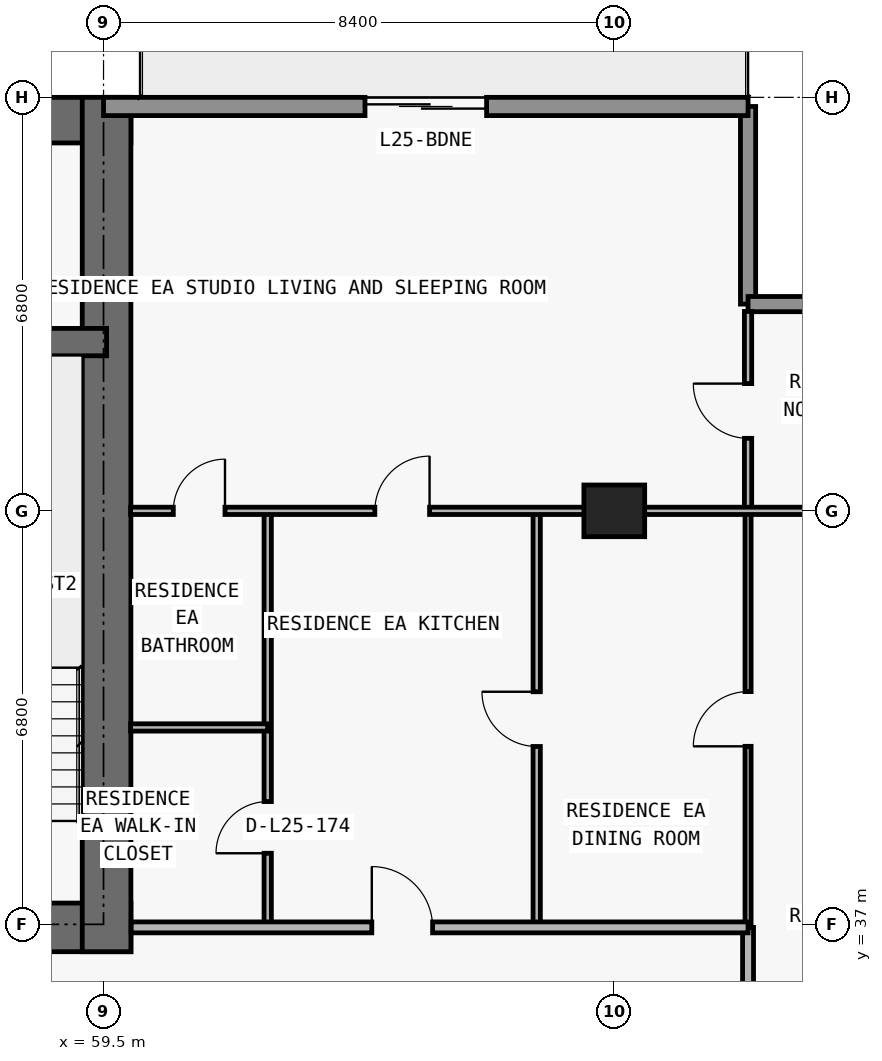
"""IFC4 building model, lengths in metres.
Left out: names, types, materials, properties, quantities, classifications, styles, units other than length and angle.
Written with IfcOpenShell. Run it as: python <this file> out.ifc"""

import sys

from ifc_helpers import new_model, si_unit, direction, frame, frame_2d, origin, origin_2d, place, context, subcontext, project, spatial, rectangle, extrude, element, fill, save


model = new_model("IFC4")
c1 = context("Model", 3, precision=1e-05, world=origin(), true_north=direction((0.0, 1.0)))
c2 = subcontext(c1, "Body", "Model", "MODEL_VIEW")
j1 = project(units=[si_unit("LENGTHUNIT", "METRE"), si_unit("PLANEANGLEUNIT", "RADIAN")], contexts=[c1])
p1 = place(None, origin())
s1 = spatial("IfcSite", under=j1, at=p1, CompositionType="ELEMENT")
p2 = place(p1, origin())
s2 = spatial("IfcBuilding", under=s1, at=p2, CompositionType="ELEMENT")
p3 = place(p2, frame((0.0, 0.0, 94.5)))
s3 = spatial("IfcBuildingStorey", under=s2, at=p3, CompositionType="ELEMENT", Elevation=94.5)
p4 = place(p3, frame((67.9, 43.8, 0.0), z_axis=(0.0, 0.0, 1.0), x_axis=(1.0, 0.0, 0.0)))
e1 = element("IfcColumn", 1, at=p4, inside=s3, PredefinedType="COLUMN", context=c2, shape_type="SweptSolid", body=[
    extrude(rectangle(XDim=1.0, YDim=0.85, at=origin_2d()), origin(), (0.0, 0.0, 1.0), 3.0),
])
p5 = place(p3, frame((17.85, 36.95, 0.0), z_axis=(0.0, 0.0, 1.0), x_axis=(1.0, 0.0, 0.0)))
e2 = element("IfcWall", 2, at=p5, inside=s3, PredefinedType="SHEAR", context=c2, shape_type="SweptSolid", body=[
    extrude(rectangle(XDim=42.1, YDim=0.8, at=frame_2d((21.05, 0.0))), origin(), (0.0, 0.0, 1.0), 3.0),
])
p6 = place(p5, frame((14.45, 0.0, 0.0)))
e3 = element("IfcOpeningElement", 3, at=p6, cuts=e2, PredefinedType="OPENING", context=c2, shape_type="SweptSolid", body=[
    extrude(rectangle(XDim=1.1, YDim=2.15, at=frame_2d((0.55, 1.075))), frame((0.0, 0.41, 0.0), z_axis=(0.0, -1.0, 0.0), x_axis=(1.0, 0.0, 0.0)), (0.0, 0.0, 1.0), 0.82),
])
p7 = place(p5, frame((6.3, 0.0, 0.0)))
e4 = element("IfcOpeningElement", 4, at=p7, cuts=e2, PredefinedType="OPENING", context=c2, shape_type="SweptSolid", body=[
    extrude(rectangle(XDim=1.05, YDim=2.15, at=frame_2d((0.525, 1.075))), frame((0.0, 0.41, 0.0), z_axis=(0.0, -1.0, 0.0), x_axis=(1.0, 0.0, 0.0)), (0.0, 0.0, 1.0), 0.82),
])
p8 = place(p5, frame((34.8, 0.0, 0.0)))
e5 = element("IfcOpeningElement", 5, at=p8, cuts=e2, PredefinedType="OPENING", context=c2, shape_type="SweptSolid", body=[
    extrude(rectangle(XDim=1.05, YDim=2.15, at=frame_2d((0.525, 1.075))), frame((0.0, 0.41, 0.0), z_axis=(0.0, -1.0, 0.0), x_axis=(1.0, 0.0, 0.0)), (0.0, 0.0, 1.0), 0.82),
])
p9 = place(p5, frame((10.913, 0.0, 0.0)))
e6 = element("IfcOpeningElement", 6, at=p9, cuts=e2, PredefinedType="OPENING", context=c2, shape_type="SweptSolid", body=[
    extrude(rectangle(XDim=1.05, YDim=2.15, at=frame_2d((0.525, 1.075))), frame((0.0, 0.41, 0.0), z_axis=(0.0, -1.0, 0.0), x_axis=(1.0, 0.0, 0.0)), (0.0, 0.0, 1.0), 0.82),
])
p10 = place(p5, frame((24.15, 0.0, 0.0)))
e7 = element("IfcOpeningElement", 7, at=p10, cuts=e2, PredefinedType="OPENING", context=c2, shape_type="SweptSolid", body=[
    extrude(rectangle(XDim=1.05, YDim=2.15, at=frame_2d((0.525, 1.075))), frame((0.0, 0.41, 0.0), z_axis=(0.0, -1.0, 0.0), x_axis=(1.0, 0.0, 0.0)), (0.0, 0.0, 1.0), 0.82),
])
p11 = place(p3, frame((17.85, 50.225, 0.0), z_axis=(0.0, 0.0, 1.0), x_axis=(1.0, 0.0, 0.0)))
e8 = element("IfcWall", 8, at=p11, inside=s3, PredefinedType="SHEAR", context=c2, shape_type="SweptSolid", body=[
    extrude(rectangle(XDim=42.1, YDim=0.75, at=frame_2d((21.05, 0.0))), origin(), (0.0, 0.0, 1.0), 3.0),
])
p12 = place(p3, frame((59.55, 36.55, 0.0), z_axis=(0.0, 0.0, 1.0), x_axis=(0.0, 1.0, 0.0)))
e9 = element("IfcWall", 9, at=p12, inside=s3, PredefinedType="SHEAR", context=c2, shape_type="SweptSolid", body=[
    extrude(rectangle(XDim=14.05, YDim=0.8, at=frame_2d((7.025, 0.0))), origin(), (0.0, 0.0, 1.0), 3.0),
])
p13 = place(p3, frame((18.25, 46.575, 0.0), z_axis=(0.0, 0.0, 1.0), x_axis=(1.0, 0.0, 0.0)))
e10 = element("IfcWall", 10, at=p13, inside=s3, PredefinedType="SHEAR", context=c2, shape_type="SweptSolid", body=[
    extrude(rectangle(XDim=41.3, YDim=0.45, at=frame_2d((20.65, 0.0))), origin(), (0.0, 0.0, 1.0), 3.0),
])
p14 = place(p13, frame((7.625, 0.0, 0.0)))
e11 = element("IfcOpeningElement", 11, at=p14, cuts=e10, PredefinedType="OPENING", context=c2, shape_type="SweptSolid", body=[
    extrude(rectangle(XDim=1.05, YDim=2.15, at=frame_2d((0.525, 1.075))), frame((0.0, 0.235, 0.0), z_axis=(0.0, -1.0, 0.0), x_axis=(1.0, 0.0, 0.0)), (0.0, 0.0, 1.0), 0.47),
])
p15 = place(p13, frame((32.675, 0.0, 0.0)))
e12 = element("IfcOpeningElement", 12, at=p15, cuts=e10, PredefinedType="OPENING", context=c2, shape_type="SweptSolid", body=[
    extrude(rectangle(XDim=1.05, YDim=2.15, at=frame_2d((0.525, 1.075))), frame((0.0, 0.235, 0.0), z_axis=(0.0, -1.0, 0.0), x_axis=(1.0, 0.0, 0.0)), (0.0, 0.0, 1.0), 0.47),
])
p16 = place(p3, frame((70.1, 50.45, 0.0), z_axis=(0.0, 0.0, 1.0), x_axis=(0.0, -1.0, 0.0)))
e13 = element("IfcWall", 13, at=p16, inside=s3, PredefinedType="ELEMENTEDWALL", context=c2, shape_type="SweptSolid", body=[
    extrude(rectangle(XDim=3.25, YDim=0.25, at=frame_2d((1.625, 0.0))), origin(), (0.0, 0.0, 1.0), 3.0),
])
p17 = place(p3, frame((70.1, 47.2, 0.0), z_axis=(0.0, 0.0, 1.0), x_axis=(1.0, 0.0, 0.0)))
e14 = element("IfcWall", 14, at=p17, inside=s3, PredefinedType="ELEMENTEDWALL", context=c2, shape_type="SweptSolid", body=[
    extrude(rectangle(XDim=3.65, YDim=0.25, at=frame_2d((1.825, 0.0))), origin(), (0.0, 0.0, 1.0), 3.0),
])
p18 = place(p3, frame((59.5, 50.45, 0.0), z_axis=(0.0, 0.0, 1.0), x_axis=(1.0, 0.0, 0.0)))
e15 = element("IfcWall", 15, at=p18, inside=s3, PredefinedType="STANDARD", context=c2, shape_type="SweptSolid", body=[
    extrude(rectangle(XDim=10.6, YDim=0.3, at=frame_2d((5.3, 0.0))), origin(), (0.0, 0.0, 1.0), 3.0),
])
p19 = place(p18, frame((4.3, 0.0, 0.0)))
e16 = element("IfcOpeningElement", 16, at=p19, cuts=e15, PredefinedType="OPENING", context=c2, shape_type="SweptSolid", body=[
    extrude(rectangle(XDim=2.0, YDim=2.3, at=frame_2d((1.0, 1.15))), frame((0.0, 0.16, 0.0), z_axis=(0.0, -1.0, 0.0), x_axis=(1.0, 0.0, 0.0)), (0.0, 0.0, 1.0), 0.32),
])
p20 = place(p3, frame((62.2, 36.95, 0.0), z_axis=(0.0, 0.0, 1.0), x_axis=(0.0, 1.0, 0.0)))
e17 = element("IfcWall", 17, at=p20, inside=s3, PredefinedType="PARTITIONING", context=c2, shape_type="SweptSolid", body=[
    extrude(rectangle(XDim=6.85, YDim=0.12, at=frame_2d((3.425, 0.0))), origin(), (0.0, 0.0, 1.0), 3.0),
])
p21 = place(p20, frame((1.219, 0.0, 0.0)))
e18 = element("IfcOpeningElement", 18, at=p21, cuts=e17, PredefinedType="OPENING", context=c2, shape_type="SweptSolid", body=[
    extrude(rectangle(XDim=0.85, YDim=2.1, at=frame_2d((0.425, 1.05))), frame((0.0, 0.07, 0.0), z_axis=(0.0, -1.0, 0.0), x_axis=(1.0, 0.0, 0.0)), (0.0, 0.0, 1.0), 0.14),
])
p22 = place(p3, frame((66.624, 36.95, 0.0), z_axis=(0.0, 0.0, 1.0), x_axis=(0.0, 1.0, 0.0)))
e19 = element("IfcWall", 19, at=p22, inside=s3, PredefinedType="PARTITIONING", context=c2, shape_type="SweptSolid", body=[
    extrude(rectangle(XDim=6.85, YDim=0.12, at=frame_2d((3.425, 0.0))), origin(), (0.0, 0.0, 1.0), 3.0),
])
p23 = place(p22, frame((2.975, 0.0, 0.0)))
e20 = element("IfcOpeningElement", 20, at=p23, cuts=e19, PredefinedType="OPENING", context=c2, shape_type="SweptSolid", body=[
    extrude(rectangle(XDim=0.9, YDim=2.15, at=frame_2d((0.45, 1.075))), frame((0.0, 0.07, 0.0), z_axis=(0.0, -1.0, 0.0), x_axis=(1.0, 0.0, 0.0)), (0.0, 0.0, 1.0), 0.14),
])
p24 = place(p3, frame((70.1, 33.805, 0.0), z_axis=(0.0, 0.0, 1.0), x_axis=(0.0, 1.0, 0.0)))
e21 = element("IfcWall", 21, at=p24, inside=s3, PredefinedType="PARTITIONING", context=c2, shape_type="SweptSolid", body=[
    extrude(rectangle(XDim=3.145, YDim=0.18, at=frame_2d((1.573, 0.0))), origin(), (0.0, 0.0, 1.0), 3.0),
])
p25 = place(p3, frame((70.1, 36.955, 0.0), z_axis=(0.0, 0.0, 1.0), x_axis=(0.0, 1.0, 0.0)))
e22 = element("IfcWall", 22, at=p25, inside=s3, PredefinedType="MOVABLE", context=c2, shape_type="SweptSolid", body=[
    extrude(rectangle(XDim=6.845, YDim=0.1, at=frame_2d((3.422, 0.0))), origin(), (0.0, 0.0, 1.0), 3.0),
])
p26 = place(p25, frame((2.972, 0.0, 0.0)))
e23 = element("IfcOpeningElement", 23, at=p26, cuts=e22, PredefinedType="OPENING", context=c2, shape_type="SweptSolid", body=[
    extrude(rectangle(XDim=0.9, YDim=2.15, at=frame_2d((0.45, 1.075))), frame((0.0, 0.06, 0.0), z_axis=(0.0, -1.0, 0.0), x_axis=(1.0, 0.0, 0.0)), (0.0, 0.0, 1.0), 0.12),
])
p27 = place(p3, frame((70.1, 43.805, 0.0), z_axis=(0.0, 0.0, 1.0), x_axis=(0.0, 1.0, 0.0)))
e24 = element("IfcWall", 24, at=p27, inside=s3, PredefinedType="PARTITIONING", context=c2, shape_type="SweptSolid", body=[
    extrude(rectangle(XDim=3.275, YDim=0.12, at=frame_2d((1.638, 0.0))), origin(), (0.0, 0.0, 1.0), 3.0),
])
p28 = place(p27, frame((1.188, 0.0, 0.0)))
e25 = element("IfcOpeningElement", 25, at=p28, cuts=e24, PredefinedType="OPENING", context=c2, shape_type="SweptSolid", body=[
    extrude(rectangle(XDim=0.9, YDim=2.15, at=frame_2d((0.45, 1.075))), frame((0.0, 0.07, 0.0), z_axis=(0.0, -1.0, 0.0), x_axis=(1.0, 0.0, 0.0)), (0.0, 0.0, 1.0), 0.14),
])
p29 = place(p3, frame((59.955, 36.95, 0.0), z_axis=(0.0, 0.0, 1.0), x_axis=(1.0, 0.0, 0.0)))
e26 = element("IfcWall", 26, at=p29, inside=s3, PredefinedType="PARTITIONING", context=c2, shape_type="SweptSolid", body=[
    extrude(rectangle(XDim=10.145, YDim=0.18, at=frame_2d((5.073, 0.0))), origin(), (0.0, 0.0, 1.0), 3.0),
])
p30 = place(p29, frame((3.957, 0.0, 0.0)))
e27 = element("IfcOpeningElement", 27, at=p30, cuts=e26, PredefinedType="OPENING", context=c2, shape_type="SweptSolid", body=[
    extrude(rectangle(XDim=1.0, YDim=2.2, at=frame_2d((0.5, 1.1))), frame((0.0, 0.1, 0.0), z_axis=(0.0, -1.0, 0.0), x_axis=(1.0, 0.0, 0.0)), (0.0, 0.0, 1.0), 0.2),
])
p31 = place(p3, frame((59.945, 40.238, 0.0), z_axis=(0.0, 0.0, 1.0), x_axis=(1.0, 0.0, 0.0)))
e28 = element("IfcWall", 28, at=p31, inside=s3, PredefinedType="PARTITIONING", context=c2, shape_type="SweptSolid", body=[
    extrude(rectangle(XDim=2.255, YDim=0.12, at=frame_2d((1.127, 0.0))), origin(), (0.0, 0.0, 1.0), 3.0),
])
p32 = place(p3, frame((59.945, 43.8, 0.0), z_axis=(0.0, 0.0, 1.0), x_axis=(1.0, 0.0, 0.0)))
e29 = element("IfcWall", 29, at=p32, inside=s3, PredefinedType="PARTITIONING", context=c2, shape_type="SweptSolid", body=[
    extrude(rectangle(XDim=13.66, YDim=0.12, at=frame_2d((6.83, 0.0))), origin(), (0.0, 0.0, 1.0), 2.289),
])
p33 = place(p32, frame((4.017, 0.0, 0.0)))
e30 = element("IfcOpeningElement", 30, at=p33, cuts=e29, PredefinedType="OPENING", context=c2, shape_type="SweptSolid", body=[
    extrude(rectangle(XDim=0.9, YDim=2.15, at=frame_2d((0.45, 1.075))), frame((0.0, 0.07, 0.0), z_axis=(0.0, -1.0, 0.0), x_axis=(1.0, 0.0, 0.0)), (0.0, 0.0, 1.0), 0.14),
])
p34 = place(p32, frame((0.702, 0.0, 0.0)))
e31 = element("IfcOpeningElement", 31, at=p34, cuts=e29, PredefinedType="OPENING", context=c2, shape_type="SweptSolid", body=[
    extrude(rectangle(XDim=0.85, YDim=2.1, at=frame_2d((0.425, 1.05))), frame((0.0, 0.07, 0.0), z_axis=(0.0, -1.0, 0.0), x_axis=(1.0, 0.0, 0.0)), (0.0, 0.0, 1.0), 0.14),
])
p35 = place(p19, origin())
e32 = element("IfcDoor", 32, at=p35, inside=s3, OperationType="DOUBLE_DOOR_SLIDING", PredefinedType="DOOR", context=c2, shape_type="SweptSolid", body=[
    extrude(rectangle(XDim=2.0, YDim=2.3, at=frame_2d((1.0, 1.15))), frame((0.0, 0.025, 0.0), z_axis=(0.0, -1.0, 0.0), x_axis=(1.0, 0.0, 0.0)), (0.0, 0.0, 1.0), 0.05),
])
fill(e16, e32)
p36 = place(p23, origin())
e33 = element("IfcDoor", 33, at=p36, inside=s3, OperationType="SINGLE_SWING_RIGHT", PredefinedType="DOOR", context=c2, shape_type="SweptSolid", body=[
    extrude(rectangle(XDim=0.9, YDim=2.15, at=frame_2d((0.45, 1.075))), frame((0.0, 0.025, 0.0), z_axis=(0.0, -1.0, 0.0), x_axis=(1.0, 0.0, 0.0)), (0.0, 0.0, 1.0), 0.05),
])
fill(e20, e33)
p37 = place(p30, origin())
e34 = element("IfcDoor", 34, at=p37, inside=s3, OperationType="SINGLE_SWING_LEFT", PredefinedType="DOOR", context=c2, shape_type="SweptSolid", body=[
    extrude(rectangle(XDim=1.0, YDim=2.2, at=frame_2d((0.5, 1.1))), frame((0.0, 0.025, 0.0), z_axis=(0.0, -1.0, 0.0), x_axis=(1.0, 0.0, 0.0)), (0.0, 0.0, 1.0), 0.05),
])
fill(e27, e34)
p38 = place(p33, origin())
e35 = element("IfcDoor", 35, at=p38, inside=s3, OperationType="SINGLE_SWING_RIGHT", PredefinedType="DOOR", context=c2, shape_type="SweptSolid", body=[
    extrude(rectangle(XDim=0.9, YDim=2.15, at=frame_2d((0.45, 1.075))), frame((0.0, 0.025, 0.0), z_axis=(0.0, -1.0, 0.0), x_axis=(1.0, 0.0, 0.0)), (0.0, 0.0, 1.0), 0.05),
])
fill(e30, e35)
p39 = place(p21, origin())
e36 = element("IfcDoor", 36, at=p39, inside=s3, OperationType="SINGLE_SWING_LEFT", PredefinedType="DOOR", context=c2, shape_type="SweptSolid", body=[
    extrude(rectangle(XDim=0.85, YDim=2.1, at=frame_2d((0.425, 1.05))), frame((0.0, 0.025, 0.0), z_axis=(0.0, -1.0, 0.0), x_axis=(1.0, 0.0, 0.0)), (0.0, 0.0, 1.0), 0.05),
])
fill(e18, e36)
p40 = place(p34, origin())
e37 = element("IfcDoor", 37, at=p40, inside=s3, OperationType="SINGLE_SWING_RIGHT", PredefinedType="DOOR", context=c2, shape_type="SweptSolid", body=[
    extrude(rectangle(XDim=0.85, YDim=2.1, at=frame_2d((0.425, 1.05))), frame((0.0, 0.025, 0.0), z_axis=(0.0, -1.0, 0.0), x_axis=(1.0, 0.0, 0.0)), (0.0, 0.0, 1.0), 0.05),
])
fill(e31, e37)
p41 = place(p26, origin())
e38 = element("IfcDoor", 38, at=p41, inside=s3, OperationType="SINGLE_SWING_LEFT", PredefinedType="DOOR", context=c2, shape_type="SweptSolid", body=[
    extrude(rectangle(XDim=0.9, YDim=2.15, at=frame_2d((0.45, 1.075))), frame((0.0, 0.025, 0.0), z_axis=(0.0, -1.0, 0.0), x_axis=(1.0, 0.0, 0.0)), (0.0, 0.0, 1.0), 0.05),
])
fill(e23, e38)
p42 = place(p28, origin())
e39 = element("IfcDoor", 39, at=p42, inside=s3, OperationType="SINGLE_SWING_RIGHT", PredefinedType="DOOR", context=c2, shape_type="SweptSolid", body=[
    extrude(rectangle(XDim=0.9, YDim=2.15, at=frame_2d((0.45, 1.075))), frame((0.0, 0.025, 0.0), z_axis=(0.0, -1.0, 0.0), x_axis=(1.0, 0.0, 0.0)), (0.0, 0.0, 1.0), 0.05),
])
fill(e25, e39)
save(model, sys.argv[1])
